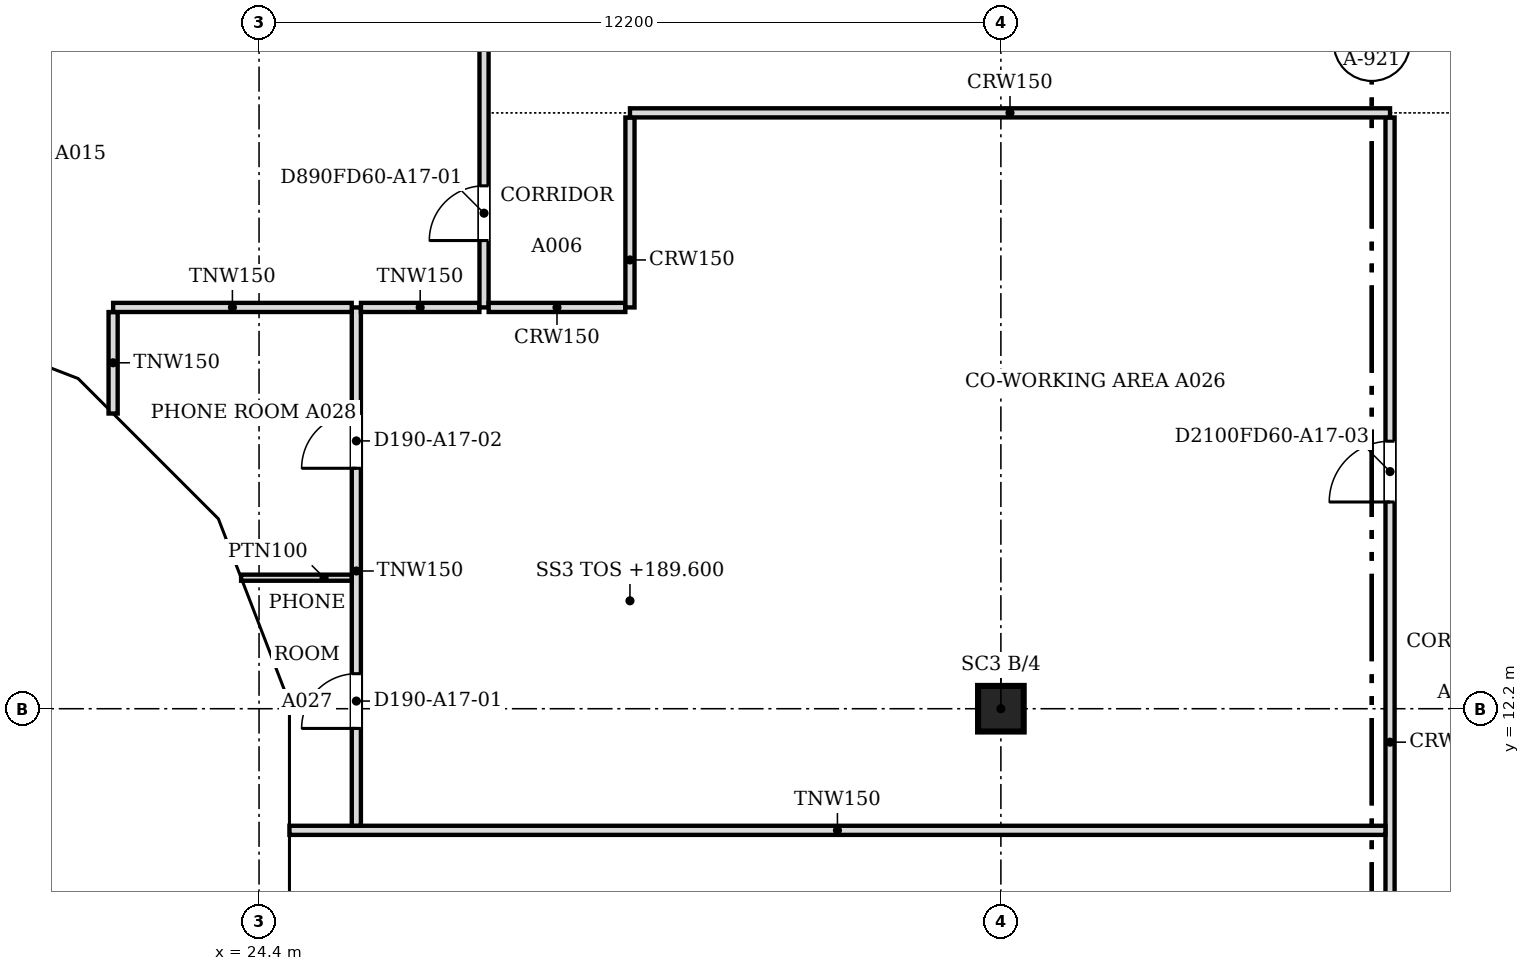
"""IFC4 building model, lengths in metres.
Left out: names, types, materials, properties, quantities, classifications, styles, units other than length and angle.
Written with IfcOpenShell. Run it as: python <this file> out.ifc"""

import sys

from ifc_helpers import new_model, si_unit, direction, frame, frame_2d, origin, origin_2d, place, context, subcontext, project, spatial, polyline, rectangle, outline, extrude, faceted_brep, source, transform, mapped, element, fill, save


model = new_model("IFC4")
c1 = context("Model", 3, precision=1e-05, world=origin(), true_north=direction((0.0, 1.0)))
c2 = subcontext(c1, "Body", "Model", "MODEL_VIEW")
j1 = project(units=[si_unit("LENGTHUNIT", "METRE"), si_unit("PLANEANGLEUNIT", "RADIAN")], contexts=[c1])
p1 = place(None, origin())
s1 = spatial("IfcSite", under=j1, at=p1, CompositionType="ELEMENT")
p2 = place(p1, origin())
s2 = spatial("IfcBuilding", under=s1, at=p2, CompositionType="ELEMENT")
p3 = place(p2, frame((0.0, 0.0, 189.6)))
s3 = spatial("IfcBuildingStorey", under=s2, at=p3, CompositionType="ELEMENT", Elevation=189.6)
p4 = place(p3, frame((36.6, 12.2, 0.0), z_axis=(0.0, 0.0, 1.0), x_axis=(1.0, 0.0, 0.0)))
e1 = element("IfcColumn", 1, at=p4, inside=s3, PredefinedType="COLUMN", context=c2, shape_type="SweptSolid", body=[
    extrude(rectangle(XDim=0.75, YDim=0.75, at=origin_2d()), origin(), (0.0, 0.0, 1.0), 3.55),
])
m1 = source(origin(), c2, "Body", "Brep", [
    faceted_brep([(3.096, -0.25, 7.536), (0.047, -0.25, 3.856), (0.047, -0.25, 3.744), (3.096, -0.25, 0.064), (0.0, 0.25, 3.8), (3.149, 0.25, 7.6), (3.202, 0.25, 7.536), (3.202, 0.25, 0.064), (3.149, 0.25, 0.0), (3.149, -0.0, 0.0), (3.149, -0.0, 7.6), (0.0, 0.0, 3.8)], [[[0, 1, 2, 3]], [[4, 5, 6, 7, 8]], [[8, 7, 9]], [[6, 5, 10]], [[5, 4, 11, 1, 0, 10]], [[4, 8, 9, 3, 2, 11]], [[2, 1, 11]], [[3, 9, 7, 6, 10, 0]]]),
])
p5 = place(p3, frame((18.346, 18.55, -3.8), z_axis=(0.0, 0.0, 1.0), x_axis=(0.932985567668, -0.359913782069, 0.0)))
e2 = element("IfcWall", 2, at=p5, inside=s3, PredefinedType="SOLIDWALL", context=c2, shape_type="MappedRepresentation", body=[
    mapped(m1, transform((0.0, 0.0, 0.0), scale=1.0)),
])
m2 = source(origin(), c2, "Body", "SweptSolid", [
    extrude(outline(polyline([(2.949, 6.967), (0.325, 3.8), (2.949, 0.633), (2.949, 6.967)])), frame((0.0, 0.26, 0.0), z_axis=(0.0, -1.0, 0.0), x_axis=(1.0, 0.0, 0.0)), (0.0, 0.0, 1.0), 0.52),
])
p6 = place(p5, origin())
e3 = element("IfcOpeningElement", 3, at=p6, cuts=e2, PredefinedType="OPENING", context=c2, shape_type="MappedRepresentation", body=[
    mapped(m2, transform((0.0, 0.0, 0.0), scale=1.0)),
])
m3 = source(origin(), c2, "Body", "Brep", [
    faceted_brep([(0.106, -0.25, 0.064), (3.156, -0.25, 3.736), (3.156, -0.25, 3.864), (0.106, -0.25, 7.536), (0.0, 0.25, 7.536), (0.053, 0.25, 7.6), (3.209, 0.25, 3.8), (0.053, 0.25, 0.0), (0.0, 0.25, 0.064), (3.209, -0.0, 3.8), (0.053, 0.0, 0.0), (0.053, 0.0, 7.6)], [[[0, 1, 2, 3]], [[4, 5, 6, 7, 8]], [[7, 6, 9, 1, 0, 10]], [[6, 5, 11, 3, 2, 9]], [[5, 4, 11]], [[8, 7, 10]], [[8, 10, 0, 3, 11, 4]], [[1, 9, 2]]]),
])
p7 = place(p3, frame((21.248, 17.454, -3.8), z_axis=(0.0, 0.0, 1.0), x_axis=(0.707106781187, -0.707106781187, 0.0)))
e4 = element("IfcWall", 4, at=p7, inside=s3, PredefinedType="SOLIDWALL", context=c2, shape_type="MappedRepresentation", body=[
    mapped(m3, transform((0.0, 0.0, 0.0), scale=1.0)),
])
m4 = source(origin(), c2, "Body", "SweptSolid", [
    extrude(outline(polyline([(0.253, 0.632), (2.884, 3.8), (0.253, 6.968), (0.253, 0.632)])), frame((0.0, 0.26, 0.0), z_axis=(0.0, -1.0, 0.0), x_axis=(1.0, 0.0, 0.0)), (0.0, 0.0, 1.0), 0.52),
])
p8 = place(p7, origin())
e5 = element("IfcOpeningElement", 5, at=p8, cuts=e4, PredefinedType="OPENING", context=c2, shape_type="MappedRepresentation", body=[
    mapped(m4, transform((0.0, 0.0, 0.0), scale=1.0)),
])
m5 = source(origin(), c2, "Body", "Brep", [
    faceted_brep([(3.103, -0.25, 7.544), (0.053, -0.25, 3.864), (0.053, -0.25, 3.736), (3.103, -0.25, 0.056), (0.0, 0.25, 3.8), (3.149, 0.25, 7.6), (3.196, 0.25, 7.543), (3.196, 0.25, 0.057), (3.149, 0.25, 0.0), (3.149, -0.0, 0.0), (3.149, -0.0, 7.6), (0.0, 0.0, 3.8)], [[[0, 1, 2, 3]], [[4, 5, 6, 7, 8]], [[8, 7, 9]], [[6, 5, 10]], [[5, 4, 11, 1, 0, 10]], [[4, 8, 9, 3, 2, 11]], [[2, 1, 11]], [[3, 9, 7, 6, 10, 0]]]),
])
p9 = place(p3, frame((23.517, 15.185, -3.8), z_axis=(0.0, 0.0, 1.0), x_axis=(0.359864468756, -0.933004589553, 0.0)))
e6 = element("IfcWall", 6, at=p9, inside=s3, PredefinedType="SOLIDWALL", context=c2, shape_type="MappedRepresentation", body=[
    mapped(m5, transform((0.0, 0.0, 0.0), scale=1.0)),
])
p10 = place(p9, origin())
e7 = element("IfcOpeningElement", 7, at=p10, cuts=e6, PredefinedType="OPENING", context=c2, shape_type="MappedRepresentation", body=[
    mapped(m2, transform((0.0, 0.0, 0.0), scale=1.0)),
])
m6 = source(origin(), c2, "Body", "Brep", [
    faceted_brep([(0.093, -0.25, 0.057), (3.143, -0.25, 3.8), (0.093, -0.25, 7.543), (0.0, 0.25, 7.544), (0.047, 0.25, 7.6), (3.143, 0.25, 3.8), (0.047, 0.25, 0.0), (0.0, 0.25, 0.056), (0.047, 0.0, 0.0), (0.047, 0.0, 7.6)], [[[0, 1, 2]], [[3, 4, 5, 6, 7]], [[6, 5, 1, 0, 8]], [[5, 4, 9, 2, 1]], [[4, 3, 9]], [[7, 6, 8]], [[7, 8, 0, 2, 9, 3]]]),
])
p11 = place(p3, frame((24.65, 12.293, -3.8), z_axis=(0.0, 0.0, 1.0), x_axis=(0.0, -1.0, 0.0)))
e8 = element("IfcWall", 8, at=p11, inside=s3, PredefinedType="SOLIDWALL", context=c2, shape_type="MappedRepresentation", body=[
    mapped(m6, transform((0.0, 0.0, 0.0), scale=1.0)),
])
m7 = source(origin(), c2, "Body", "SweptSolid", [
    extrude(outline(polyline([(0.247, 0.641), (2.821, 3.8), (0.247, 6.959), (0.247, 0.641)])), frame((0.0, 0.26, 0.0), z_axis=(0.0, -1.0, 0.0), x_axis=(1.0, 0.0, 0.0)), (0.0, 0.0, 1.0), 0.52),
])
p12 = place(p11, origin())
e9 = element("IfcOpeningElement", 9, at=p12, cuts=e8, PredefinedType="OPENING", context=c2, shape_type="MappedRepresentation", body=[
    mapped(m7, transform((0.0, 0.0, 0.0), scale=1.0)),
])
m8 = source(origin(), c2, "Body", "Brep", [
    faceted_brep([(0.093, -0.25, 0.056), (3.143, -0.25, 3.736), (3.143, -0.25, 3.8), (0.093, -0.25, 3.8), (0.0, 0.25, 3.8), (3.196, 0.25, 3.8), (0.047, 0.25, 0.0), (0.0, 0.25, 0.057), (3.196, -0.0, 3.8), (0.047, 0.0, 0.0)], [[[0, 1, 2, 3]], [[4, 5, 6, 7]], [[6, 5, 8, 1, 0, 9]], [[5, 4, 3, 2, 8]], [[7, 6, 9]], [[7, 9, 0, 3, 4]], [[1, 8, 2]]]),
])
p13 = place(p3, frame((18.303, 18.567, 0.0), z_axis=(0.0, 0.0, 1.0), x_axis=(0.932978940178, -0.359930961693, 0.0)))
e10 = element("IfcWall", 10, at=p13, inside=s3, PredefinedType="SOLIDWALL", context=c2, shape_type="MappedRepresentation", body=[
    mapped(m8, transform((0.0, 0.0, 0.0), scale=1.0)),
])
m9 = source(origin(), c2, "Body", "SweptSolid", [
    extrude(outline(polyline([(0.247, 0.633), (2.664, 3.55), (0.247, 3.55), (0.247, 0.633)])), frame((0.0, 0.26, 0.0), z_axis=(0.0, -1.0, 0.0), x_axis=(1.0, 0.0, 0.0)), (0.0, 0.0, 1.0), 0.52),
])
p14 = place(p13, origin())
e11 = element("IfcOpeningElement", 11, at=p14, cuts=e10, PredefinedType="OPENING", context=c2, shape_type="MappedRepresentation", body=[
    mapped(m9, transform((0.0, 0.0, 0.0), scale=1.0)),
])
m10 = source(origin(), c2, "Body", "Brep", [
    faceted_brep([(3.103, -0.25, 3.8), (0.053, -0.25, 3.8), (0.053, -0.25, 3.736), (3.103, -0.25, 0.064), (0.0, 0.25, 3.8), (3.209, 0.25, 3.8), (3.209, 0.25, 0.064), (3.156, 0.25, 0.0), (3.156, -0.0, 0.0), (0.0, 0.0, 3.8)], [[[0, 1, 2, 3]], [[4, 5, 6, 7]], [[7, 6, 8]], [[5, 4, 9, 1, 0]], [[4, 7, 8, 3, 2, 9]], [[2, 1, 9]], [[3, 8, 6, 5, 0]]]),
])
p15 = place(p3, frame((21.285, 17.417, 0.0), z_axis=(0.0, 0.0, 1.0), x_axis=(0.707106781187, -0.707106781187, 0.0)))
e12 = element("IfcWall", 12, at=p15, inside=s3, PredefinedType="SOLIDWALL", context=c2, shape_type="MappedRepresentation", body=[
    mapped(m10, transform((0.0, 0.0, 0.0), scale=1.0)),
])
m11 = source(origin(), c2, "Body", "SweptSolid", [
    extrude(outline(polyline([(2.956, 3.55), (0.533, 3.55), (2.956, 0.632), (2.956, 3.55)])), frame((0.0, 0.26, 0.0), z_axis=(0.0, -1.0, 0.0), x_axis=(1.0, 0.0, 0.0)), (0.0, 0.0, 1.0), 0.52),
])
p16 = place(p15, origin())
e13 = element("IfcOpeningElement", 13, at=p16, cuts=e12, PredefinedType="OPENING", context=c2, shape_type="MappedRepresentation", body=[
    mapped(m11, transform((0.0, 0.0, 0.0), scale=1.0)),
])
m12 = source(origin(), c2, "Body", "Brep", [
    faceted_brep([(0.106, -0.25, 0.064), (3.156, -0.25, 3.744), (3.156, -0.25, 3.8), (0.106, -0.25, 3.8), (0.0, 0.25, 3.8), (3.202, 0.25, 3.8), (0.053, 0.25, 0.0), (0.0, 0.25, 0.064), (3.202, -0.0, 3.8), (0.053, 0.0, 0.0)], [[[0, 1, 2, 3]], [[4, 5, 6, 7]], [[6, 5, 8, 1, 0, 9]], [[5, 4, 3, 2, 8]], [[7, 6, 9]], [[7, 9, 0, 3, 4]], [[1, 8, 2]]]),
])
p17 = place(p3, frame((23.497, 15.234, 0.0), z_axis=(0.0, 0.0, 1.0), x_axis=(0.359913782069, -0.932985567668, 0.0)))
e14 = element("IfcWall", 14, at=p17, inside=s3, PredefinedType="SOLIDWALL", context=c2, shape_type="MappedRepresentation", body=[
    mapped(m12, transform((0.0, 0.0, 0.0), scale=1.0)),
])
m13 = source(origin(), c2, "Body", "SweptSolid", [
    extrude(outline(polyline([(0.253, 0.633), (2.671, 3.55), (0.253, 3.55), (0.253, 0.633)])), frame((0.0, 0.26, 0.0), z_axis=(0.0, -1.0, 0.0), x_axis=(1.0, 0.0, 0.0)), (0.0, 0.0, 1.0), 0.52),
])
p18 = place(p17, origin())
e15 = element("IfcOpeningElement", 15, at=p18, cuts=e14, PredefinedType="OPENING", context=c2, shape_type="MappedRepresentation", body=[
    mapped(m13, transform((0.0, 0.0, 0.0), scale=1.0)),
])
m14 = source(origin(), c2, "Body", "Brep", [
    faceted_brep([(3.096, -0.25, 0.0), (6.1, -0.25, 3.8), (0.047, -0.25, 3.8), (0.047, -0.25, 3.743), (0.0, 0.25, 3.8), (6.053, 0.25, 3.8), (6.053, 0.25, 3.741), (3.096, 0.25, 0.0), (6.1, -0.0, 3.8), (0.0, 0.0, 3.8)], [[[0, 1, 2, 3]], [[4, 5, 6, 7]], [[7, 6, 8, 1, 0]], [[5, 4, 9, 2, 1, 8]], [[4, 7, 0, 3, 9]], [[3, 2, 9]], [[6, 5, 8]]]),
])
p19 = place(p3, frame((24.65, 12.247, 0.0), z_axis=(0.0, 0.0, 1.0), x_axis=(0.0, -1.0, 0.0)))
e16 = element("IfcWall", 16, at=p19, inside=s3, PredefinedType="SOLIDWALL", context=c2, shape_type="MappedRepresentation", body=[
    mapped(m14, transform((0.0, 0.0, 0.0), scale=1.0)),
])
m15 = source(origin(), c2, "Body", "SweptSolid", [
    extrude(outline(polyline([(3.094, 0.399), (5.584, 3.55), (0.526, 3.55), (3.094, 0.399)])), frame((0.0, 0.26, 0.0), z_axis=(0.0, -1.0, 0.0), x_axis=(1.0, 0.0, 0.0)), (0.0, 0.0, 1.0), 0.52),
])
p20 = place(p19, origin())
e17 = element("IfcOpeningElement", 17, at=p20, cuts=e16, PredefinedType="OPENING", context=c2, shape_type="MappedRepresentation", body=[
    mapped(m15, transform((0.0, 0.0, 0.0), scale=1.0)),
])
p21 = place(p3, frame((43.0, 0.5, 0.0), z_axis=(0.0, 0.0, 1.0), x_axis=(0.0, 1.0, 0.0)))
e18 = element("IfcWall", 18, at=p21, inside=s3, PredefinedType="PARTITIONING", context=c2, shape_type="SweptSolid", body=[
    extrude(rectangle(XDim=21.424, YDim=0.15, at=frame_2d((10.712, 0.0))), origin(), (0.0, 0.0, 1.0), 2.947),
])
m16 = source(origin(), c2, "Body", "SweptSolid", [
    extrude(rectangle(XDim=1.0, YDim=2.1, at=frame_2d((0.5, 1.05))), frame((0.0, 0.085, 0.0), z_axis=(0.0, -1.0, 0.0), x_axis=(1.0, 0.0, 0.0)), (0.0, 0.0, 1.0), 0.17),
])
p22 = place(p21, frame((6.2, 0.0, 0.0)))
e19 = element("IfcOpeningElement", 19, at=p22, cuts=e18, PredefinedType="OPENING", context=c2, shape_type="MappedRepresentation", body=[
    mapped(m16, transform((0.0, 0.0, 0.0), scale=1.0)),
])
p23 = place(p21, frame((15.1, 0.0, 0.0)))
e20 = element("IfcOpeningElement", 20, at=p23, cuts=e18, PredefinedType="OPENING", context=c2, shape_type="MappedRepresentation", body=[
    mapped(m16, transform((0.0, 0.0, 0.0), scale=1.0)),
])
p24 = place(p3, frame((24.9, 10.2, 0.0), z_axis=(0.0, 0.0, 1.0), x_axis=(1.0, 0.0, 0.0)))
e21 = element("IfcWall", 21, at=p24, inside=s3, PredefinedType="PARTITIONING", context=c2, shape_type="SweptSolid", body=[
    extrude(rectangle(XDim=18.024, YDim=0.15, at=frame_2d((9.012, 0.0))), origin(), (0.0, 0.0, 1.0), 2.947),
])
p25 = place(p3, frame((26.0, 10.276, 0.0), z_axis=(0.0, 0.0, 1.0), x_axis=(0.0, 1.0, 0.0)))
e22 = element("IfcWall", 22, at=p25, inside=s3, PredefinedType="PARTITIONING", context=c2, shape_type="SweptSolid", body=[
    extrude(rectangle(XDim=8.524, YDim=0.15, at=frame_2d((4.262, 0.0))), origin(), (0.0, 0.0, 1.0), 2.947),
])
m17 = source(origin(), c2, "Body", "SweptSolid", [
    extrude(rectangle(XDim=0.9, YDim=2.1, at=frame_2d((0.45, 1.05))), frame((0.0, 0.085, 0.0), z_axis=(0.0, -1.0, 0.0), x_axis=(1.0, 0.0, 0.0)), (0.0, 0.0, 1.0), 0.17),
])
p26 = place(p25, frame((1.6, 0.0, 0.0)))
e23 = element("IfcOpeningElement", 23, at=p26, cuts=e22, PredefinedType="OPENING", context=c2, shape_type="MappedRepresentation", body=[
    mapped(m17, transform((0.0, 0.0, 0.0), scale=1.0)),
])
p27 = place(p25, frame((5.879, 0.0, 0.0)))
e24 = element("IfcOpeningElement", 24, at=p27, cuts=e22, PredefinedType="OPENING", context=c2, shape_type="MappedRepresentation", body=[
    mapped(m17, transform((0.0, 0.0, 0.0), scale=1.0)),
])
p28 = place(p3, frame((24.105, 14.355, 0.0), z_axis=(0.0, 0.0, 1.0), x_axis=(1.0, 0.0, 0.0)))
e25 = element("IfcWall", 25, at=p28, inside=s3, PredefinedType="PARTITIONING", context=c2, shape_type="SweptSolid", body=[
    extrude(rectangle(XDim=1.819, YDim=0.1, at=frame_2d((0.91, 0.0))), origin(), (0.0, 0.0, 1.0), 2.947),
])
p29 = place(p3, frame((22.0, 17.055, 0.0), z_axis=(0.0, 0.0, 1.0), x_axis=(0.0, 1.0, 0.0)))
e26 = element("IfcWall", 26, at=p29, inside=s3, PredefinedType="PARTITIONING", context=c2, shape_type="SweptSolid", body=[
    extrude(rectangle(XDim=1.669, YDim=0.15, at=frame_2d((0.834, 0.0))), origin(), (0.0, 0.0, 1.0), 2.947),
])
p30 = place(p3, frame((22.0, 18.8, 0.0), z_axis=(0.0, 0.0, 1.0), x_axis=(1.0, 0.0, 0.0)))
e27 = element("IfcWall", 27, at=p30, inside=s3, PredefinedType="PARTITIONING", context=c2, shape_type="SweptSolid", body=[
    extrude(rectangle(XDim=3.924, YDim=0.15, at=frame_2d((1.962, 0.0))), origin(), (0.0, 0.0, 1.0), 2.947),
])
p31 = place(p3, frame((26.076, 18.8, 0.0), z_axis=(0.0, 0.0, 1.0), x_axis=(1.0, 0.0, 0.0)))
e28 = element("IfcWall", 28, at=p31, inside=s3, PredefinedType="PARTITIONING", context=c2, shape_type="SweptSolid", body=[
    extrude(rectangle(XDim=1.948, YDim=0.15, at=frame_2d((0.974, 0.0))), origin(), (0.0, 0.0, 1.0), 2.947),
])
p32 = place(p3, frame((28.1, 18.8, 0.0), z_axis=(0.0, 0.0, 1.0), x_axis=(0.0, 1.0, 0.0)))
e29 = element("IfcWall", 29, at=p32, inside=s3, PredefinedType="PARTITIONING", context=c2, shape_type="SweptSolid", body=[
    extrude(rectangle(XDim=26.424, YDim=0.15, at=frame_2d((13.212, 0.0))), origin(), (0.0, 0.0, 1.0), 2.947),
])
p33 = place(p32, frame((1.1, 0.0, 0.0)))
e30 = element("IfcOpeningElement", 30, at=p33, cuts=e29, PredefinedType="OPENING", context=c2, shape_type="MappedRepresentation", body=[
    mapped(m17, transform((0.0, 0.0, 0.0), scale=1.0)),
])
p34 = place(p32, frame((14.301, 0.0, 0.0)))
e31 = element("IfcOpeningElement", 31, at=p34, cuts=e29, PredefinedType="OPENING", context=c2, shape_type="MappedRepresentation", body=[
    mapped(m17, transform((0.0, 0.0, 0.0), scale=1.0)),
])
p35 = place(p32, frame((8.2, 0.0, 0.0)))
e32 = element("IfcOpeningElement", 32, at=p35, cuts=e29, PredefinedType="OPENING", context=c2, shape_type="MappedRepresentation", body=[
    mapped(m17, transform((0.0, 0.0, 0.0), scale=1.0)),
])
p36 = place(p32, frame((21.6, 0.0, 0.0)))
e33 = element("IfcOpeningElement", 33, at=p36, cuts=e29, PredefinedType="OPENING", context=c2, shape_type="MappedRepresentation", body=[
    mapped(m16, transform((0.0, 0.0, 0.0), scale=1.0)),
])
p37 = place(p3, frame((28.176, 18.8, 0.0), z_axis=(0.0, 0.0, 1.0), x_axis=(1.0, 0.0, 0.0)))
e34 = element("IfcWall", 34, at=p37, inside=s3, PredefinedType="PARTITIONING", context=c2, shape_type="SweptSolid", body=[
    extrude(rectangle(XDim=2.248, YDim=0.15, at=frame_2d((1.124, 0.0))), origin(), (0.0, 0.0, 1.0), 2.947),
])
p38 = place(p3, frame((30.5, 18.8, 0.0), z_axis=(0.0, 0.0, 1.0), x_axis=(0.0, 1.0, 0.0)))
e35 = element("IfcWall", 35, at=p38, inside=s3, PredefinedType="PARTITIONING", context=c2, shape_type="SweptSolid", body=[
    extrude(rectangle(XDim=3.124, YDim=0.15, at=frame_2d((1.562, 0.0))), origin(), (0.0, 0.0, 1.0), 2.947),
])
p39 = place(p3, frame((30.5, 22.0, 0.0), z_axis=(0.0, 0.0, 1.0), x_axis=(1.0, 0.0, 0.0)))
e36 = element("IfcWall", 36, at=p39, inside=s3, PredefinedType="PARTITIONING", context=c2, shape_type="SweptSolid", body=[
    extrude(rectangle(XDim=12.5, YDim=0.15, at=frame_2d((6.25, 0.0))), origin(), (0.0, 0.0, 1.0), 2.947),
])
m18 = source(origin(), c2, "Body", "SweptSolid", [
    extrude(rectangle(XDim=0.9, YDim=2.1, at=frame_2d((0.45, 1.05))), frame((0.0, 0.025, 0.0), z_axis=(0.0, -1.0, 0.0), x_axis=(1.0, 0.0, 0.0)), (0.0, 0.0, 1.0), 0.05),
])
p40 = place(p33, origin())
e37 = element("IfcDoor", 37, at=p40, inside=s3, OperationType="SINGLE_SWING_LEFT", PredefinedType="DOOR", context=c2, shape_type="MappedRepresentation", body=[
    mapped(m18, transform((0.0, 0.0, 0.0), scale=1.0)),
])
fill(e30, e37)
p41 = place(p26, origin())
e38 = element("IfcDoor", 38, at=p41, inside=s3, OperationType="SINGLE_SWING_LEFT", PredefinedType="DOOR", context=c2, shape_type="MappedRepresentation", body=[
    mapped(m18, transform((0.0, 0.0, 0.0), scale=1.0)),
])
fill(e23, e38)
p42 = place(p27, origin())
e39 = element("IfcDoor", 39, at=p42, inside=s3, OperationType="SINGLE_SWING_LEFT", PredefinedType="DOOR", context=c2, shape_type="MappedRepresentation", body=[
    mapped(m18, transform((0.0, 0.0, 0.0), scale=1.0)),
])
fill(e24, e39)
m19 = source(origin(), c2, "Body", "SweptSolid", [
    extrude(rectangle(XDim=1.0, YDim=2.1, at=frame_2d((0.5, 1.05))), frame((0.0, 0.025, 0.0), z_axis=(0.0, -1.0, 0.0), x_axis=(1.0, 0.0, 0.0)), (0.0, 0.0, 1.0), 0.05),
])
p43 = place(p23, origin())
e40 = element("IfcDoor", 40, at=p43, inside=s3, OperationType="SINGLE_SWING_LEFT", PredefinedType="DOOR", context=c2, shape_type="MappedRepresentation", body=[
    mapped(m19, transform((0.0, 0.0, 0.0), scale=1.0)),
])
fill(e20, e40)
save(model, sys.argv[1])
